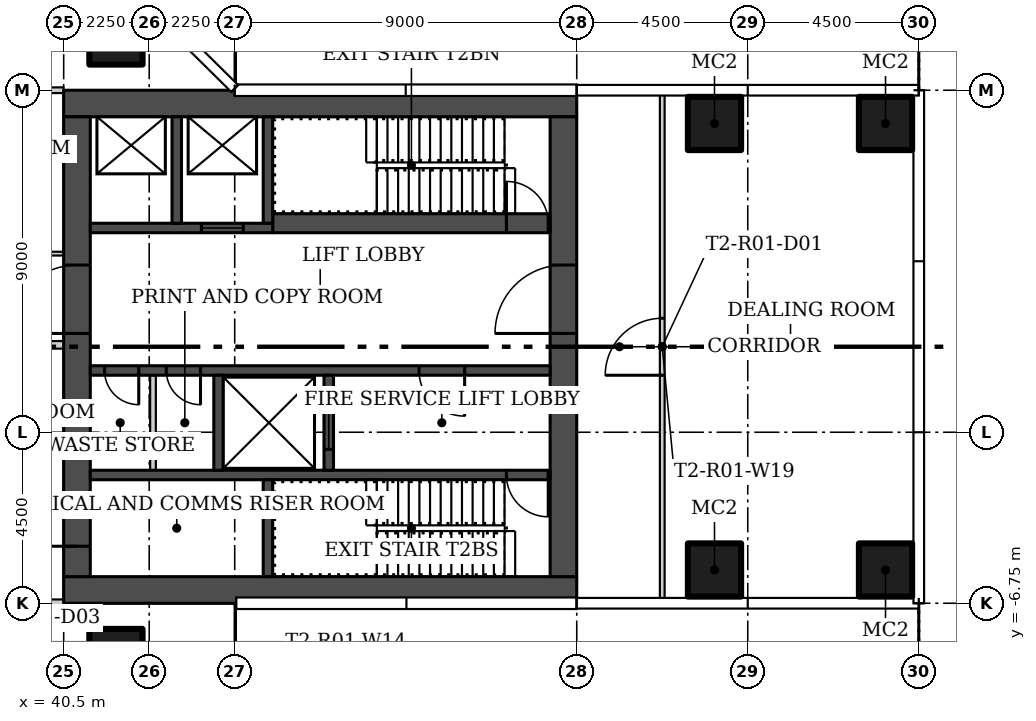
"""IFC4 building model, lengths in metres.
Left out: names, types, materials, properties, quantities, classifications, styles, units other than length and angle.
Written with IfcOpenShell. Run it as: python <this file> out.ifc"""

import sys

from ifc_helpers import new_model, si_unit, direction, frame, frame_2d, origin, origin_2d, place, context, subcontext, project, spatial, rectangle, hollow_rectangle, extrude, element, fill, save


model = new_model("IFC4")
c1 = context("Model", 3, precision=1e-05, world=origin(), true_north=direction((0.0, 1.0)))
c2 = subcontext(c1, "Body", "Model", "MODEL_VIEW")
j1 = project(units=[si_unit("LENGTHUNIT", "METRE"), si_unit("PLANEANGLEUNIT", "RADIAN")], contexts=[c1])
p1 = place(None, origin())
s1 = spatial("IfcSite", under=j1, at=p1, CompositionType="ELEMENT")
p2 = place(p1, origin())
s2 = spatial("IfcBuilding", under=s1, at=p2, CompositionType="ELEMENT")
p3 = place(p2, frame((0.0, 0.0, 28.5)))
s3 = spatial("IfcBuildingStorey", under=s2, at=p3, CompositionType="ELEMENT", Elevation=28.5)
for number, where in (
    (1, (41.875, 8.125, 0.0)),
    (2, (41.875, -8.125, 0.0)),
    (3, (57.625, -5.875, 0.0)),
    (4, (62.125, -5.875, 0.0)),
    (5, (57.625, 5.875, 0.0)),
    (6, (62.125, 5.875, 0.0)),
):
    element("IfcColumn", number, at=place(p3, frame(where)), inside=s3, PredefinedType="COLUMN", context=c2, shape_type="SweptSolid", body=[
        extrude(hollow_rectangle(XDim=1.4, YDim=1.4, WallThickness=0.05, at=origin_2d()), origin(), (0.0, 0.0, 1.0), 4.15),
    ])
p4 = place(p3, frame((40.5, 0.05, 0.0), z_axis=(0.0, 0.0, 1.0), x_axis=(-1.0, 0.0, 0.0)))
e7 = element("IfcWall", 7, at=p4, inside=s3, PredefinedType="PARTITIONING", context=c2, shape_type="SweptSolid", body=[
    extrude(rectangle(XDim=5.95, YDim=0.2, at=frame_2d((2.975, 0.0))), origin(), (0.0, 0.0, 1.0), 4.15),
])
p5 = place(p3, frame((34.55, -6.75, 0.0)))
e8 = element("IfcWall", 8, at=p5, inside=s3, PredefinedType="PARTITIONING", context=c2, shape_type="SweptSolid", body=[
    extrude(rectangle(XDim=5.95, YDim=0.2, at=frame_2d((2.975, 0.0))), origin(), (0.0, 0.0, 1.0), 4.15),
])
p6 = place(p3, frame((34.6, 2.45, 0.0)))
e9 = element("IfcWall", 9, at=p6, inside=s3, PredefinedType="PARTITIONING", context=c2, shape_type="SweptSolid", body=[
    extrude(rectangle(XDim=5.9, YDim=0.1, at=frame_2d((2.95, 0.0))), origin(), (0.0, 0.0, 1.0), 4.15),
])
p7 = place(p3, frame((56.25, -6.655, 0.0), z_axis=(0.0, 0.0, 1.0), x_axis=(0.0, 1.0, 0.0)))
e10 = element("IfcWall", 10, at=p7, inside=s3, PredefinedType="PARTITIONING", context=c2, shape_type="SweptSolid", body=[
    extrude(rectangle(XDim=13.31, YDim=0.125, at=frame_2d((6.655, 0.0))), origin(), (0.0, 0.0, 1.0), 4.15),
])
p8 = place(p7, frame((5.905, 0.0, 0.0)))
e11 = element("IfcOpeningElement", 11, at=p8, cuts=e10, PredefinedType="OPENING", context=c2, shape_type="SweptSolid", body=[
    extrude(rectangle(XDim=1.5, YDim=2.1, at=frame_2d((0.75, 1.05))), frame((0.0, 0.073, 0.0), z_axis=(0.0, -1.0, 0.0), x_axis=(1.0, 0.0, 0.0)), (0.0, 0.0, 1.0), 0.145),
])
p9 = place(p3, frame((40.5, 6.75, 0.0), z_axis=(0.0, 0.0, 1.0), x_axis=(-1.0, 0.0, 0.0)))
e12 = element("IfcWall", 12, at=p9, inside=s3, PredefinedType="PARTITIONING", context=c2, shape_type="SweptSolid", body=[
    extrude(rectangle(XDim=0.65, YDim=0.15, at=frame_2d((0.325, 0.0))), origin(), (0.0, 0.0, 1.0), 4.15),
])
for number, where, z_axis, x_axis in (
    (13, (54.0, -6.4, 0.0), (0.0, 0.0, 1.0), (-1.0, 0.0, 0.0)),
    (14, (54.0, 6.4, 0.0), (0.0, 0.0, 1.0), (-1.0, 0.0, 0.0)),
):
    element("IfcWall", number, at=place(p3, frame(where, z_axis=z_axis, x_axis=x_axis)), inside=s3, PredefinedType="SHEAR", context=c2, shape_type="SweptSolid", body=[
        extrude(rectangle(XDim=13.5, YDim=0.7, at=frame_2d((6.75, 0.0))), origin(), (0.0, 0.0, 1.0), 4.15),
    ])
p10 = place(p3, frame((53.65, -6.05, 0.0), z_axis=(0.0, 0.0, 1.0), x_axis=(0.0, 1.0, 0.0)))
e15 = element("IfcWall", 15, at=p10, inside=s3, PredefinedType="SHEAR", context=c2, shape_type="SweptSolid", body=[
    extrude(rectangle(XDim=12.1, YDim=0.7, at=frame_2d((6.05, 0.0))), origin(), (0.0, 0.0, 1.0), 4.15),
])
p11 = place(p10, frame((6.4, 0.0, 0.0)))
e16 = element("IfcOpeningElement", 16, at=p11, cuts=e15, PredefinedType="OPENING", context=c2, shape_type="SweptSolid", body=[
    extrude(rectangle(XDim=1.8, YDim=2.4, at=frame_2d((0.9, 1.2))), frame((0.0, 0.36, 0.0), z_axis=(0.0, -1.0, 0.0), x_axis=(1.0, 0.0, 0.0)), (0.0, 0.0, 1.0), 0.72),
])
p12 = place(p3, frame((40.85, -6.05, 0.0), z_axis=(0.0, 0.0, 1.0), x_axis=(0.0, 1.0, 0.0)))
e17 = element("IfcWall", 17, at=p12, inside=s3, PredefinedType="SHEAR", context=c2, shape_type="SweptSolid", body=[
    extrude(rectangle(XDim=12.1, YDim=0.7, at=frame_2d((6.05, 0.0))), origin(), (0.0, 0.0, 1.0), 4.15),
])
p13 = place(p12, frame((0.8, 0.0, 0.0)))
e18 = element("IfcOpeningElement", 18, at=p13, cuts=e17, PredefinedType="OPENING", context=c2, shape_type="SweptSolid", body=[
    extrude(rectangle(XDim=1.2, YDim=2.1, at=frame_2d((0.6, 1.05))), frame((0.0, 0.36, 0.0), z_axis=(0.0, -1.0, 0.0), x_axis=(1.0, 0.0, 0.0)), (0.0, 0.0, 1.0), 0.72),
])
p14 = place(p12, frame((6.4, 0.0, 0.0)))
e19 = element("IfcOpeningElement", 19, at=p14, cuts=e17, PredefinedType="OPENING", context=c2, shape_type="SweptSolid", body=[
    extrude(rectangle(XDim=1.8, YDim=2.4, at=frame_2d((0.9, 1.2))), frame((0.0, 0.36, 0.0), z_axis=(0.0, -1.0, 0.0), x_axis=(1.0, 0.0, 0.0)), (0.0, 0.0, 1.0), 0.72),
])
p15 = place(p3, frame((53.3, -3.375, 0.0), z_axis=(0.0, 0.0, 1.0), x_axis=(-1.0, 0.0, 0.0)))
e20 = element("IfcWall", 20, at=p15, inside=s3, PredefinedType="SHEAR", context=c2, shape_type="SweptSolid", body=[
    extrude(rectangle(XDim=12.1, YDim=0.25, at=frame_2d((6.05, 0.0))), origin(), (0.0, 0.0, 1.0), 4.15),
])
p16 = place(p15, frame((0.05, 0.0, 0.0)))
e21 = element("IfcOpeningElement", 21, at=p16, cuts=e20, PredefinedType="OPENING", context=c2, shape_type="SweptSolid", body=[
    extrude(rectangle(XDim=1.1, YDim=2.1, at=frame_2d((0.55, 1.05))), frame((0.0, 0.135, 0.0), z_axis=(0.0, -1.0, 0.0), x_axis=(1.0, 0.0, 0.0)), (0.0, 0.0, 1.0), 0.27),
])
p17 = place(p3, frame((45.875, -6.05, 0.0), z_axis=(0.0, 0.0, 1.0), x_axis=(0.0, 1.0, 0.0)))
e22 = element("IfcWall", 22, at=p17, inside=s3, PredefinedType="SHEAR", context=c2, shape_type="SweptSolid", body=[
    extrude(rectangle(XDim=2.55, YDim=0.25, at=frame_2d((1.275, 0.0))), origin(), (0.0, 0.0, 1.0), 4.15),
])
p18 = place(p3, frame((53.3, -0.625, 0.0), z_axis=(0.0, 0.0, 1.0), x_axis=(-1.0, 0.0, 0.0)))
e23 = element("IfcWall", 23, at=p18, inside=s3, PredefinedType="SHEAR", context=c2, shape_type="SweptSolid", body=[
    extrude(rectangle(XDim=12.1, YDim=0.25, at=frame_2d((6.05, 0.0))), origin(), (0.0, 0.0, 1.0), 4.15),
])
p19 = place(p18, frame((2.25, 0.0, 0.0)))
e24 = element("IfcOpeningElement", 24, at=p19, cuts=e23, PredefinedType="OPENING", context=c2, shape_type="SweptSolid", body=[
    extrude(rectangle(XDim=1.2, YDim=2.1, at=frame_2d((0.6, 1.05))), frame((0.0, 0.135, 0.0), z_axis=(0.0, -1.0, 0.0), x_axis=(1.0, 0.0, 0.0)), (0.0, 0.0, 1.0), 0.27),
])
p20 = place(p18, frame((9.2, 0.0, 0.0)))
e25 = element("IfcOpeningElement", 25, at=p20, cuts=e23, PredefinedType="OPENING", context=c2, shape_type="SweptSolid", body=[
    extrude(rectangle(XDim=0.9, YDim=2.1, at=frame_2d((0.45, 1.05))), frame((0.0, 0.135, 0.0), z_axis=(0.0, -1.0, 0.0), x_axis=(1.0, 0.0, 0.0)), (0.0, 0.0, 1.0), 0.27),
])
p21 = place(p18, frame((10.825, 0.0, 0.0)))
e26 = element("IfcOpeningElement", 26, at=p21, cuts=e23, PredefinedType="OPENING", context=c2, shape_type="SweptSolid", body=[
    extrude(rectangle(XDim=0.9, YDim=2.1, at=frame_2d((0.45, 1.05))), frame((0.0, 0.135, 0.0), z_axis=(0.0, -1.0, 0.0), x_axis=(1.0, 0.0, 0.0)), (0.0, 0.0, 1.0), 0.27),
])
p22 = place(p3, frame((47.475, -3.25, 0.0), z_axis=(0.0, 0.0, 1.0), x_axis=(0.0, 1.0, 0.0)))
e27 = element("IfcWall", 27, at=p22, inside=s3, PredefinedType="SHEAR", context=c2, shape_type="SweptSolid", body=[
    extrude(rectangle(XDim=2.5, YDim=0.25, at=frame_2d((1.25, 0.0))), origin(), (0.0, 0.0, 1.0), 4.15),
])
p23 = place(p22, frame((0.55, 0.0, 0.0)))
e28 = element("IfcOpeningElement", 28, at=p23, cuts=e27, PredefinedType="OPENING", context=c2, shape_type="SweptSolid", body=[
    extrude(rectangle(XDim=1.4, YDim=2.4, at=frame_2d((0.7, 1.2))), frame((0.0, 0.135, 0.0), z_axis=(0.0, -1.0, 0.0), x_axis=(1.0, 0.0, 0.0)), (0.0, 0.0, 1.0), 0.27),
])
p24 = place(p3, frame((44.575, -3.25, 0.0), z_axis=(0.0, 0.0, 1.0), x_axis=(0.0, 1.0, 0.0)))
e29 = element("IfcWall", 29, at=p24, inside=s3, PredefinedType="SHEAR", context=c2, shape_type="SweptSolid", body=[
    extrude(rectangle(XDim=2.5, YDim=0.25, at=frame_2d((1.25, 0.0))), origin(), (0.0, 0.0, 1.0), 4.15),
])
p25 = place(p3, frame((42.85, -3.25, 0.0), z_axis=(0.0, 0.0, 1.0), x_axis=(0.0, 1.0, 0.0)))
e30 = element("IfcWall", 30, at=p25, inside=s3, PredefinedType="PARTITIONING", context=c2, shape_type="SweptSolid", body=[
    extrude(rectangle(XDim=2.5, YDim=0.15, at=frame_2d((1.25, 0.0))), origin(), (0.0, 0.0, 1.0), 4.15),
])
p26 = place(p3, frame((46.0, 3.25, 0.0)))
e31 = element("IfcWall", 31, at=p26, inside=s3, PredefinedType="SHEAR", context=c2, shape_type="SweptSolid", body=[
    extrude(rectangle(XDim=7.3, YDim=0.5, at=frame_2d((3.65, 0.0))), origin(), (0.0, 0.0, 1.0), 4.15),
])
p27 = place(p26, frame((6.15, 0.0, 0.0)))
e32 = element("IfcOpeningElement", 32, at=p27, cuts=e31, PredefinedType="OPENING", context=c2, shape_type="SweptSolid", body=[
    extrude(rectangle(XDim=1.1, YDim=2.1, at=frame_2d((0.55, 1.05))), frame((0.0, 0.26, 0.0), z_axis=(0.0, -1.0, 0.0), x_axis=(1.0, 0.0, 0.0)), (0.0, 0.0, 1.0), 0.52),
])
p28 = place(p3, frame((46.0, 3.125, 0.0), z_axis=(0.0, 0.0, 1.0), x_axis=(-1.0, 0.0, 0.0)))
e33 = element("IfcWall", 33, at=p28, inside=s3, PredefinedType="SHEAR", context=c2, shape_type="SweptSolid", body=[
    extrude(rectangle(XDim=4.8, YDim=0.25, at=frame_2d((2.4, 0.0))), origin(), (0.0, 0.0, 1.0), 4.15),
])
p29 = place(p28, frame((0.775, 0.0, 0.0)))
e34 = element("IfcOpeningElement", 34, at=p29, cuts=e33, PredefinedType="OPENING", context=c2, shape_type="SweptSolid", body=[
    extrude(rectangle(XDim=1.1, YDim=2.1, at=frame_2d((0.55, 1.05))), frame((0.0, 0.135, 0.0), z_axis=(0.0, -1.0, 0.0), x_axis=(1.0, 0.0, 0.0)), (0.0, 0.0, 1.0), 0.27),
])
for number, where, z_axis, x_axis in (
    (35, (45.875, 3.25, 0.0), (0.0, 0.0, 1.0), (0.0, 1.0, 0.0)),
    (36, (43.475, 3.25, 0.0), (0.0, 0.0, 1.0), (0.0, 1.0, 0.0)),
):
    element("IfcWall", number, at=place(p3, frame(where, z_axis=z_axis, x_axis=x_axis)), inside=s3, PredefinedType="SHEAR", context=c2, shape_type="SweptSolid", body=[
        extrude(rectangle(XDim=2.8, YDim=0.25, at=frame_2d((1.4, 0.0))), origin(), (0.0, 0.0, 1.0), 4.15),
    ])
p30 = place(p8, origin())
e37 = element("IfcDoor", 37, at=p30, inside=s3, OperationType="DOUBLE_DOOR_SINGLE_SWING", PredefinedType="DOOR", context=c2, shape_type="SweptSolid", body=[
    extrude(rectangle(XDim=1.5, YDim=2.1, at=frame_2d((0.75, 1.05))), frame((0.0, 0.025, 0.0), z_axis=(0.0, -1.0, 0.0), x_axis=(1.0, 0.0, 0.0)), (0.0, 0.0, 1.0), 0.05),
])
fill(e11, e37)
p31 = place(p11, origin())
e38 = element("IfcDoor", 38, at=p31, inside=s3, OperationType="DOUBLE_DOOR_SINGLE_SWING", PredefinedType="DOOR", context=c2, shape_type="SweptSolid", body=[
    extrude(rectangle(XDim=1.8, YDim=2.4, at=frame_2d((0.9, 1.2))), frame((0.0, 0.025, 0.0), z_axis=(0.0, -1.0, 0.0), x_axis=(1.0, 0.0, 0.0)), (0.0, 0.0, 1.0), 0.05),
])
fill(e16, e38)
p32 = place(p13, origin())
e39 = element("IfcDoor", 39, at=p32, inside=s3, OperationType="SINGLE_SWING_LEFT", PredefinedType="DOOR", context=c2, shape_type="SweptSolid", body=[
    extrude(rectangle(XDim=1.2, YDim=2.1, at=frame_2d((0.6, 1.05))), frame((0.0, 0.025, 0.0), z_axis=(0.0, -1.0, 0.0), x_axis=(1.0, 0.0, 0.0)), (0.0, 0.0, 1.0), 0.05),
])
fill(e18, e39)
p33 = place(p14, origin())
e40 = element("IfcDoor", 40, at=p33, inside=s3, OperationType="DOUBLE_DOOR_SINGLE_SWING", PredefinedType="DOOR", context=c2, shape_type="SweptSolid", body=[
    extrude(rectangle(XDim=1.8, YDim=2.4, at=frame_2d((0.9, 1.2))), frame((0.0, 0.025, 0.0), z_axis=(0.0, -1.0, 0.0), x_axis=(1.0, 0.0, 0.0)), (0.0, 0.0, 1.0), 0.05),
])
fill(e19, e40)
p34 = place(p16, origin())
e41 = element("IfcDoor", 41, at=p34, inside=s3, OperationType="SINGLE_SWING_LEFT", PredefinedType="DOOR", context=c2, shape_type="SweptSolid", body=[
    extrude(rectangle(XDim=1.1, YDim=2.1, at=frame_2d((0.55, 1.05))), frame((0.0, 0.025, 0.0), z_axis=(0.0, -1.0, 0.0), x_axis=(1.0, 0.0, 0.0)), (0.0, 0.0, 1.0), 0.05),
])
fill(e21, e41)
p35 = place(p19, origin())
e42 = element("IfcDoor", 42, at=p35, inside=s3, OperationType="SINGLE_SWING_LEFT", PredefinedType="DOOR", context=c2, shape_type="SweptSolid", body=[
    extrude(rectangle(XDim=1.2, YDim=2.1, at=frame_2d((0.6, 1.05))), frame((0.0, 0.025, 0.0), z_axis=(0.0, -1.0, 0.0), x_axis=(1.0, 0.0, 0.0)), (0.0, 0.0, 1.0), 0.05),
])
fill(e24, e42)
p36 = place(p20, origin())
e43 = element("IfcDoor", 43, at=p36, inside=s3, OperationType="SINGLE_SWING_RIGHT", PredefinedType="DOOR", context=c2, shape_type="SweptSolid", body=[
    extrude(rectangle(XDim=0.9, YDim=2.1, at=frame_2d((0.45, 1.05))), frame((0.0, 0.025, 0.0), z_axis=(0.0, -1.0, 0.0), x_axis=(1.0, 0.0, 0.0)), (0.0, 0.0, 1.0), 0.05),
])
fill(e25, e43)
p37 = place(p21, origin())
e44 = element("IfcDoor", 44, at=p37, inside=s3, OperationType="SINGLE_SWING_RIGHT", PredefinedType="DOOR", context=c2, shape_type="SweptSolid", body=[
    extrude(rectangle(XDim=0.9, YDim=2.1, at=frame_2d((0.45, 1.05))), frame((0.0, 0.025, 0.0), z_axis=(0.0, -1.0, 0.0), x_axis=(1.0, 0.0, 0.0)), (0.0, 0.0, 1.0), 0.05),
])
fill(e26, e44)
p38 = place(p23, origin())
e45 = element("IfcDoor", 45, at=p38, inside=s3, OperationType="SLIDING_TO_LEFT", PredefinedType="DOOR", context=c2, shape_type="SweptSolid", body=[
    extrude(rectangle(XDim=1.4, YDim=2.4, at=frame_2d((0.7, 1.2))), frame((0.0, 0.025, 0.0), z_axis=(0.0, -1.0, 0.0), x_axis=(1.0, 0.0, 0.0)), (0.0, 0.0, 1.0), 0.05),
])
fill(e28, e45)
p39 = place(p27, origin())
e46 = element("IfcDoor", 46, at=p39, inside=s3, OperationType="SINGLE_SWING_RIGHT", PredefinedType="DOOR", context=c2, shape_type="SweptSolid", body=[
    extrude(rectangle(XDim=1.1, YDim=2.1, at=frame_2d((0.55, 1.05))), frame((0.0, 0.025, 0.0), z_axis=(0.0, -1.0, 0.0), x_axis=(1.0, 0.0, 0.0)), (0.0, 0.0, 1.0), 0.05),
])
fill(e32, e46)
p40 = place(p29, origin())
e47 = element("IfcDoor", 47, at=p40, inside=s3, OperationType="SLIDING_TO_LEFT", PredefinedType="DOOR", context=c2, shape_type="SweptSolid", body=[
    extrude(rectangle(XDim=1.1, YDim=2.1, at=frame_2d((0.55, 1.05))), frame((0.0, 0.025, 0.0), z_axis=(0.0, -1.0, 0.0), x_axis=(1.0, 0.0, 0.0)), (0.0, 0.0, 1.0), 0.05),
])
fill(e34, e47)
save(model, sys.argv[1])
